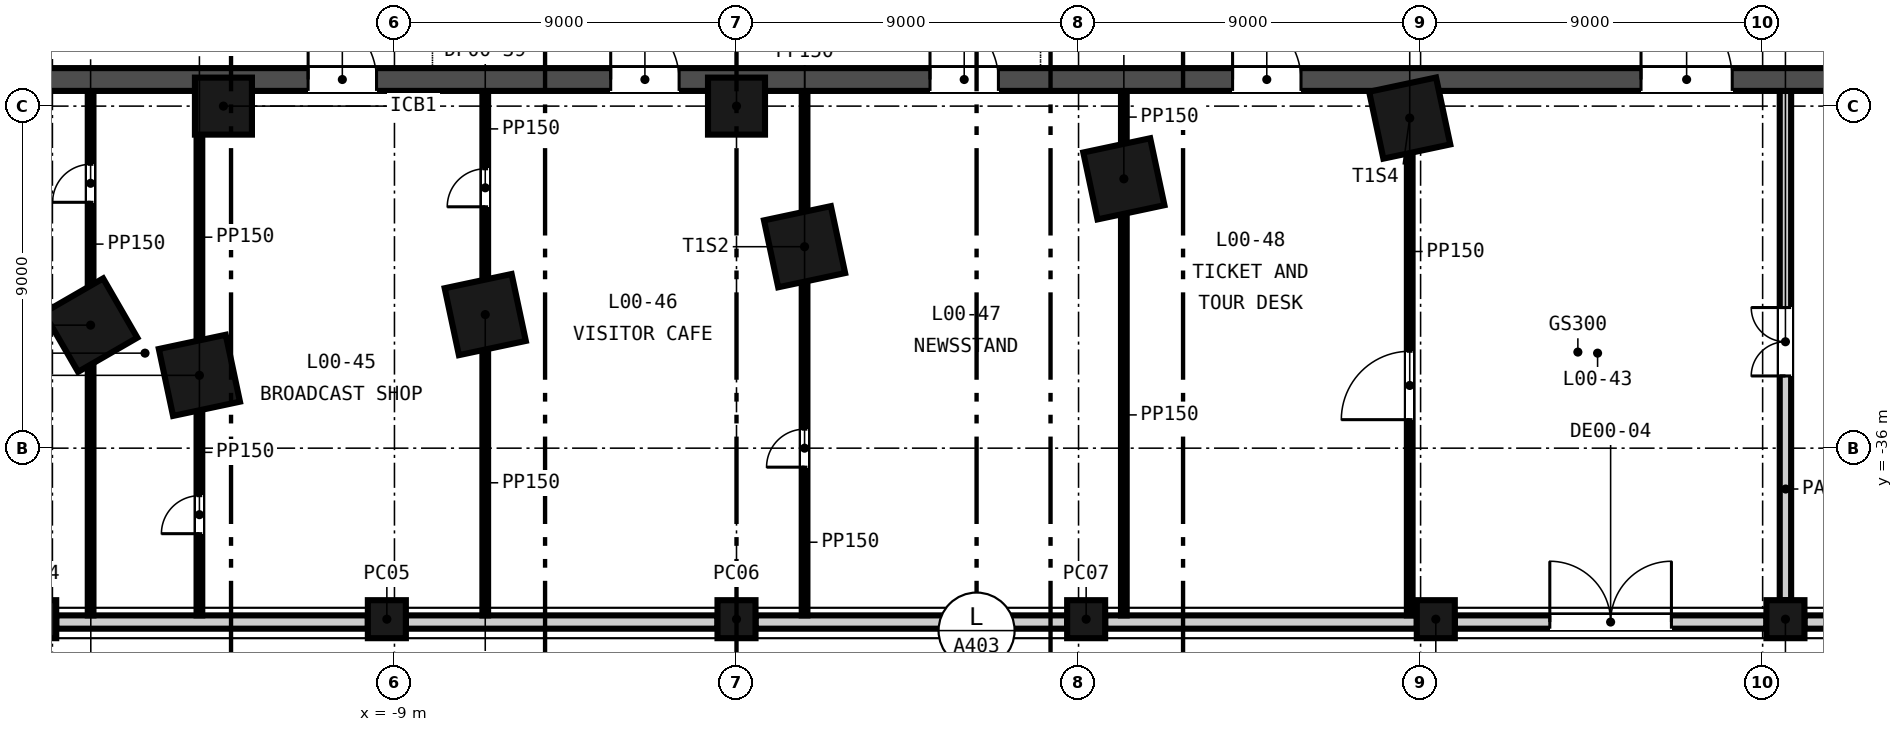
"""IFC4 building model, lengths in metres.
Left out: names, types, materials, properties, quantities, classifications, styles, units other than length and angle.
Written with IfcOpenShell. Run it as: python <this file> out.ifc"""

import sys

from ifc_helpers import new_model, si_unit, direction, frame, frame_2d, origin, origin_2d, place, context, subcontext, project, spatial, rectangle, extrude, element, fill, save


model = new_model("IFC4")
c1 = context("Model", 3, precision=1e-05, world=origin(), true_north=direction((0.0, 1.0)))
c2 = subcontext(c1, "Body", "Model", "MODEL_VIEW")
j1 = project(units=[si_unit("LENGTHUNIT", "METRE"), si_unit("PLANEANGLEUNIT", "RADIAN")], contexts=[c1])
p1 = place(None, origin())
s1 = spatial("IfcSite", under=j1, at=p1, CompositionType="ELEMENT")
p2 = place(p1, origin())
s2 = spatial("IfcBuilding", under=s1, at=p2, CompositionType="ELEMENT")
p3 = place(p2, origin())
s3 = spatial("IfcBuildingStorey", under=s2, at=p3, CompositionType="ELEMENT", Elevation=0.0)
for number, where, z_axis, x_axis in (
    (1, (-16.995, -32.763, -0.3), (0.0, 0.0, 1.0), (0.5, -0.866, 0.0)),
    (2, (-14.132, -34.084, -0.3), (0.0, 0.0, 1.0), (0.978, 0.208, 0.0)),
    (3, (-6.611, -32.485, -0.3), (0.0, 0.0, 1.0), (0.978, 0.208, 0.0)),
    (4, (1.791, -30.699, -0.3), (0.0, 0.0, 1.0), (0.978, 0.208, 0.0)),
    (5, (10.192, -28.914, -0.3), (0.0, 0.0, 1.0), (0.978, 0.208, 0.0)),
    (6, (17.714, -27.315, -0.3), (0.0, 0.0, 1.0), (0.978, 0.208, 0.0)),
):
    element("IfcColumn", number, at=place(p3, frame(where, z_axis=z_axis, x_axis=x_axis)), inside=s3, PredefinedType="COLUMN", context=c2, shape_type="SweptSolid", body=[
        extrude(rectangle(XDim=1.8, YDim=1.8, at=origin_2d()), origin(), (0.0, 0.0, 1.0), 8.9),
    ])
for number, where, z_axis, x_axis in (
    (7, (-13.5, -27.0, -0.3), (0.0, 0.0, 1.0), (1.0, 0.0, 0.0)),
    (8, (0.0, -27.0, -0.3), (0.0, 0.0, 1.0), (1.0, 0.0, 0.0)),
):
    element("IfcColumn", number, at=place(p3, frame(where, z_axis=z_axis, x_axis=x_axis)), inside=s3, PredefinedType="COLUMN", context=c2, shape_type="SweptSolid", body=[
        extrude(rectangle(XDim=1.5, YDim=1.5, at=origin_2d()), origin(), (0.0, 0.0, 1.0), 8.9),
    ])
for number, where, z_axis, x_axis in (
    (9, (-18.4, -40.5, -0.3), (0.0, 0.0, 1.0), (1.0, 0.0, 0.0)),
    (10, (-9.2, -40.5, -0.3), (0.0, 0.0, 1.0), (1.0, 0.0, 0.0)),
    (11, (0.0, -40.5, -0.3), (0.0, 0.0, 1.0), (1.0, 0.0, 0.0)),
    (12, (9.2, -40.5, -0.3), (0.0, 0.0, 1.0), (1.0, 0.0, 0.0)),
    (13, (18.4, -40.5, -0.3), (0.0, 0.0, 1.0), (1.0, 0.0, 0.0)),
    (14, (27.6, -40.5, -0.3), (0.0, 0.0, 1.0), (1.0, 0.0, 0.0)),
):
    element("IfcColumn", number, at=place(p3, frame(where, z_axis=z_axis, x_axis=x_axis)), inside=s3, PredefinedType="COLUMN", context=c2, shape_type="SweptSolid", body=[
        extrude(rectangle(XDim=1.0, YDim=1.0, at=origin_2d()), origin(), (0.0, 0.0, 1.0), 8.9),
    ])
p4 = place(p3, frame((-19.861, -26.3, -0.3), z_axis=(0.0, 0.0, 1.0), x_axis=(1.0, 0.0, 0.0)))
e15 = element("IfcWall", 15, at=p4, inside=s3, PredefinedType="SOLIDWALL", context=c2, shape_type="SweptSolid", body=[
    extrude(rectangle(XDim=71.861, YDim=0.6, at=frame_2d((35.93, 0.0))), origin(), (0.0, 0.0, 1.0), 8.9),
])
p5 = place(p4, frame((54.661, 0.0, 0.3)))
e16 = element("IfcOpeningElement", 16, at=p5, cuts=e15, PredefinedType="OPENING", context=c2, shape_type="SweptSolid", body=[
    extrude(rectangle(XDim=2.4, YDim=2.4, at=frame_2d((1.2, 1.2))), frame((0.0, 0.31, 0.0), z_axis=(0.0, -1.0, 0.0), x_axis=(1.0, 0.0, 0.0)), (0.0, 0.0, 1.0), 0.62),
])
p6 = place(p4, frame((8.589, 0.0, 0.3)))
e17 = element("IfcOpeningElement", 17, at=p6, cuts=e15, PredefinedType="OPENING", context=c2, shape_type="SweptSolid", body=[
    extrude(rectangle(XDim=1.8, YDim=2.4, at=frame_2d((0.9, 1.2))), frame((0.0, 0.31, 0.0), z_axis=(0.0, -1.0, 0.0), x_axis=(1.0, 0.0, 0.0)), (0.0, 0.0, 1.0), 0.62),
])
p7 = place(p4, frame((16.551, 0.0, 0.3)))
e18 = element("IfcOpeningElement", 18, at=p7, cuts=e15, PredefinedType="OPENING", context=c2, shape_type="SweptSolid", body=[
    extrude(rectangle(XDim=1.8, YDim=2.4, at=frame_2d((0.9, 1.2))), frame((0.0, 0.31, 0.0), z_axis=(0.0, -1.0, 0.0), x_axis=(1.0, 0.0, 0.0)), (0.0, 0.0, 1.0), 0.62),
])
p8 = place(p4, frame((24.952, 0.0, 0.3)))
e19 = element("IfcOpeningElement", 19, at=p8, cuts=e15, PredefinedType="OPENING", context=c2, shape_type="SweptSolid", body=[
    extrude(rectangle(XDim=1.8, YDim=2.4, at=frame_2d((0.9, 1.2))), frame((0.0, 0.31, 0.0), z_axis=(0.0, -1.0, 0.0), x_axis=(1.0, 0.0, 0.0)), (0.0, 0.0, 1.0), 0.62),
])
p9 = place(p4, frame((32.914, 0.0, 0.3)))
e20 = element("IfcOpeningElement", 20, at=p9, cuts=e15, PredefinedType="OPENING", context=c2, shape_type="SweptSolid", body=[
    extrude(rectangle(XDim=1.8, YDim=2.4, at=frame_2d((0.9, 1.2))), frame((0.0, 0.31, 0.0), z_axis=(0.0, -1.0, 0.0), x_axis=(1.0, 0.0, 0.0)), (0.0, 0.0, 1.0), 0.62),
])
p10 = place(p4, frame((43.661, 0.0, 0.3)))
e21 = element("IfcOpeningElement", 21, at=p10, cuts=e15, PredefinedType="OPENING", context=c2, shape_type="SweptSolid", body=[
    extrude(rectangle(XDim=2.4, YDim=2.4, at=frame_2d((1.2, 1.2))), frame((0.0, 0.31, 0.0), z_axis=(0.0, -1.0, 0.0), x_axis=(1.0, 0.0, 0.0)), (0.0, 0.0, 1.0), 0.62),
])
for number, where, z_axis, x_axis in (
    (22, (-17.9, -40.575, -0.3), (0.0, 0.0, 1.0), (1.0, 0.0, 0.0)),
    (23, (-8.7, -40.575, -0.3), (0.0, 0.0, 1.0), (1.0, 0.0, 0.0)),
    (24, (0.5, -40.575, -0.3), (0.0, 0.0, 1.0), (1.0, 0.0, 0.0)),
    (25, (9.7, -40.575, -0.3), (0.0, 0.0, 1.0), (1.0, 0.0, 0.0)),
):
    element("IfcWall", number, at=place(p3, frame(where, z_axis=z_axis, x_axis=x_axis)), inside=s3, PredefinedType="SOLIDWALL", context=c2, shape_type="SweptSolid", body=[
        extrude(rectangle(XDim=8.2, YDim=0.35, at=frame_2d((4.1, 0.0))), origin(), (0.0, 0.0, 1.0), 8.0),
    ])
p11 = place(p3, frame((18.9, -40.575, -0.3), z_axis=(0.0, 0.0, 1.0), x_axis=(1.0, 0.0, 0.0)))
e26 = element("IfcWall", 26, at=p11, inside=s3, PredefinedType="SOLIDWALL", context=c2, shape_type="SweptSolid", body=[
    extrude(rectangle(XDim=8.2, YDim=0.35, at=frame_2d((4.1, 0.0))), origin(), (0.0, 0.0, 1.0), 8.0),
])
p12 = place(p11, frame((2.5, 0.0, 0.3)))
e27 = element("IfcOpeningElement", 27, at=p12, cuts=e26, PredefinedType="OPENING", context=c2, shape_type="SweptSolid", body=[
    extrude(rectangle(XDim=3.2, YDim=4.0, at=frame_2d((1.6, 2.0))), frame((0.0, 0.185, 0.0), z_axis=(0.0, -1.0, 0.0), x_axis=(1.0, 0.0, 0.0)), (0.0, 0.0, 1.0), 0.37),
])
p13 = place(p3, frame((28.1, -40.575, -0.3), z_axis=(0.0, 0.0, 1.0), x_axis=(1.0, 0.0, 0.0)))
e28 = element("IfcWall", 28, at=p13, inside=s3, PredefinedType="SOLIDWALL", context=c2, shape_type="SweptSolid", body=[
    extrude(rectangle(XDim=8.2, YDim=0.35, at=frame_2d((4.1, 0.0))), origin(), (0.0, 0.0, 1.0), 8.0),
])
p14 = place(p3, frame((-16.995, -40.4, 0.0), z_axis=(0.0, 0.0, 1.0), x_axis=(0.0, 1.0, 0.0)))
e29 = element("IfcWall", 29, at=p14, inside=s3, PredefinedType="PARTITIONING", context=c2, shape_type="SweptSolid", body=[
    extrude(rectangle(XDim=6.554, YDim=0.15, at=frame_2d((3.277, 0.0))), origin(), (0.0, 0.0, 1.0), 8.6),
])
p15 = place(p3, frame((-16.995, -31.681, 0.0), z_axis=(0.0, 0.0, 1.0), x_axis=(0.0, 1.0, 0.0)))
e30 = element("IfcWall", 30, at=p15, inside=s3, PredefinedType="PARTITIONING", context=c2, shape_type="SweptSolid", body=[
    extrude(rectangle(XDim=5.081, YDim=0.15, at=frame_2d((2.54, 0.0))), origin(), (0.0, 0.0, 1.0), 8.6),
])
p16 = place(p15, frame((2.15, 0.0, 0.0)))
e31 = element("IfcOpeningElement", 31, at=p16, cuts=e30, PredefinedType="OPENING", context=c2, shape_type="SweptSolid", body=[
    extrude(rectangle(XDim=1.0, YDim=2.1, at=frame_2d((0.5, 1.05))), frame((0.0, 0.085, 0.0), z_axis=(0.0, -1.0, 0.0), x_axis=(1.0, 0.0, 0.0)), (0.0, 0.0, 1.0), 0.17),
])
p17 = place(p3, frame((-14.132, -40.4, 0.0), z_axis=(0.0, 0.0, 1.0), x_axis=(0.0, 1.0, 0.0)))
e32 = element("IfcWall", 32, at=p17, inside=s3, PredefinedType="PARTITIONING", context=c2, shape_type="SweptSolid", body=[
    extrude(rectangle(XDim=5.38, YDim=0.15, at=frame_2d((2.69, 0.0))), origin(), (0.0, 0.0, 1.0), 8.6),
])
p18 = place(p17, frame((2.15, 0.0, 0.0)))
e33 = element("IfcOpeningElement", 33, at=p18, cuts=e32, PredefinedType="OPENING", context=c2, shape_type="SweptSolid", body=[
    extrude(rectangle(XDim=1.0, YDim=2.1, at=frame_2d((0.5, 1.05))), frame((0.0, 0.085, 0.0), z_axis=(0.0, -1.0, 0.0), x_axis=(1.0, 0.0, 0.0)), (0.0, 0.0, 1.0), 0.17),
])
p19 = place(p3, frame((-14.132, -33.148, 0.0), z_axis=(0.0, 0.0, 1.0), x_axis=(0.0, 1.0, 0.0)))
e34 = element("IfcWall", 34, at=p19, inside=s3, PredefinedType="PARTITIONING", context=c2, shape_type="SweptSolid", body=[
    extrude(rectangle(XDim=5.398, YDim=0.15, at=frame_2d((2.699, 0.0))), origin(), (0.0, 0.0, 1.0), 8.6),
])
p20 = place(p3, frame((-6.611, -40.4, 0.0), z_axis=(0.0, 0.0, 1.0), x_axis=(0.0, 1.0, 0.0)))
e35 = element("IfcWall", 35, at=p20, inside=s3, PredefinedType="PARTITIONING", context=c2, shape_type="SweptSolid", body=[
    extrude(rectangle(XDim=6.979, YDim=0.15, at=frame_2d((3.489, 0.0))), origin(), (0.0, 0.0, 1.0), 8.6),
])
p21 = place(p3, frame((-6.611, -31.549, 0.0), z_axis=(0.0, 0.0, 1.0), x_axis=(0.0, 1.0, 0.0)))
e36 = element("IfcWall", 36, at=p21, inside=s3, PredefinedType="PARTITIONING", context=c2, shape_type="SweptSolid", body=[
    extrude(rectangle(XDim=4.949, YDim=0.15, at=frame_2d((2.475, 0.0))), origin(), (0.0, 0.0, 1.0), 8.6),
])
p22 = place(p21, frame((1.9, 0.0, 0.0)))
e37 = element("IfcOpeningElement", 37, at=p22, cuts=e36, PredefinedType="OPENING", context=c2, shape_type="SweptSolid", body=[
    extrude(rectangle(XDim=1.0, YDim=2.1, at=frame_2d((0.5, 1.05))), frame((0.0, 0.085, 0.0), z_axis=(0.0, -1.0, 0.0), x_axis=(1.0, 0.0, 0.0)), (0.0, 0.0, 1.0), 0.17),
])
p23 = place(p3, frame((1.791, -40.4, 0.0), z_axis=(0.0, 0.0, 1.0), x_axis=(0.0, 1.0, 0.0)))
e38 = element("IfcWall", 38, at=p23, inside=s3, PredefinedType="PARTITIONING", context=c2, shape_type="SweptSolid", body=[
    extrude(rectangle(XDim=8.765, YDim=0.15, at=frame_2d((4.382, 0.0))), origin(), (0.0, 0.0, 1.0), 8.6),
])
p24 = place(p23, frame((3.9, 0.0, 0.0)))
e39 = element("IfcOpeningElement", 39, at=p24, cuts=e38, PredefinedType="OPENING", context=c2, shape_type="SweptSolid", body=[
    extrude(rectangle(XDim=1.0, YDim=2.1, at=frame_2d((0.5, 1.05))), frame((0.0, 0.085, 0.0), z_axis=(0.0, -1.0, 0.0), x_axis=(1.0, 0.0, 0.0)), (0.0, 0.0, 1.0), 0.17),
])
p25 = place(p3, frame((1.791, -29.763, 0.0), z_axis=(0.0, 0.0, 1.0), x_axis=(0.0, 1.0, 0.0)))
e40 = element("IfcWall", 40, at=p25, inside=s3, PredefinedType="PARTITIONING", context=c2, shape_type="SweptSolid", body=[
    extrude(rectangle(XDim=3.163, YDim=0.15, at=frame_2d((1.582, 0.0))), origin(), (0.0, 0.0, 1.0), 8.6),
])
p26 = place(p3, frame((10.192, -40.4, 0.0), z_axis=(0.0, 0.0, 1.0), x_axis=(0.0, 1.0, 0.0)))
e41 = element("IfcWall", 41, at=p26, inside=s3, PredefinedType="PARTITIONING", context=c2, shape_type="SweptSolid", body=[
    extrude(rectangle(XDim=10.55, YDim=0.15, at=frame_2d((5.275, 0.0))), origin(), (0.0, 0.0, 1.0), 8.6),
])
p27 = place(p3, frame((10.192, -27.978, 0.0), z_axis=(0.0, 0.0, 1.0), x_axis=(0.0, 1.0, 0.0)))
e42 = element("IfcWall", 42, at=p27, inside=s3, PredefinedType="PARTITIONING", context=c2, shape_type="SweptSolid", body=[
    extrude(rectangle(XDim=1.377, YDim=0.15, at=frame_2d((0.689, 0.0))), origin(), (0.0, 0.0, 1.0), 8.6),
])
p28 = place(p3, frame((17.714, -40.4, 0.0), z_axis=(0.0, 0.0, 1.0), x_axis=(0.0, 1.0, 0.0)))
e43 = element("IfcWall", 43, at=p28, inside=s3, PredefinedType="PARTITIONING", context=c2, shape_type="SweptSolid", body=[
    extrude(rectangle(XDim=12.149, YDim=0.15, at=frame_2d((6.075, 0.0))), origin(), (0.0, 0.0, 1.0), 8.6),
])
p29 = place(p28, frame((5.15, 0.0, 0.0)))
e44 = element("IfcOpeningElement", 44, at=p29, cuts=e43, PredefinedType="OPENING", context=c2, shape_type="SweptSolid", body=[
    extrude(rectangle(XDim=1.8, YDim=2.4, at=frame_2d((0.9, 1.2))), frame((0.0, 0.085, 0.0), z_axis=(0.0, -1.0, 0.0), x_axis=(1.0, 0.0, 0.0)), (0.0, 0.0, 1.0), 0.17),
])
p30 = place(p3, frame((27.6, -40.0, 0.0), z_axis=(0.0, 0.0, 1.0), x_axis=(0.0, 1.0, 0.0)))
e45 = element("IfcWall", 45, at=p30, inside=s3, PredefinedType="PARTITIONING", context=c2, shape_type="SweptSolid", body=[
    extrude(rectangle(XDim=13.4, YDim=0.3, at=frame_2d((6.7, 0.0))), origin(), (0.0, 0.0, 1.0), 8.6),
])
p31 = place(p30, frame((5.9, 0.0, 0.0)))
e46 = element("IfcOpeningElement", 46, at=p31, cuts=e45, PredefinedType="OPENING", context=c2, shape_type="SweptSolid", body=[
    extrude(rectangle(XDim=1.8, YDim=2.4, at=frame_2d((0.9, 1.2))), frame((0.0, 0.16, 0.0), z_axis=(0.0, -1.0, 0.0), x_axis=(1.0, 0.0, 0.0)), (0.0, 0.0, 1.0), 0.32),
])
p32 = place(p12, origin())
e47 = element("IfcDoor", 47, at=p32, inside=s3, OperationType="DOUBLE_DOOR_SINGLE_SWING", PredefinedType="DOOR", context=c2, shape_type="SweptSolid", body=[
    extrude(rectangle(XDim=3.2, YDim=4.0, at=frame_2d((1.6, 2.0))), frame((0.0, 0.025, 0.0), z_axis=(0.0, -1.0, 0.0), x_axis=(1.0, 0.0, 0.0)), (0.0, 0.0, 1.0), 0.05),
])
fill(e27, e47)
p33 = place(p31, origin())
e48 = element("IfcDoor", 48, at=p33, inside=s3, OperationType="SINGLE_SWING_LEFT", PredefinedType="DOOR", context=c2, shape_type="SweptSolid", body=[
    extrude(rectangle(XDim=1.8, YDim=2.4, at=frame_2d((0.9, 1.2))), frame((0.0, 0.025, 0.0), z_axis=(0.0, -1.0, 0.0), x_axis=(1.0, 0.0, 0.0)), (0.0, 0.0, 1.0), 0.05),
])
fill(e46, e48)
p34 = place(p16, origin())
e49 = element("IfcDoor", 49, at=p34, inside=s3, OperationType="SINGLE_SWING_LEFT", PredefinedType="DOOR", context=c2, shape_type="SweptSolid", body=[
    extrude(rectangle(XDim=1.0, YDim=2.1, at=frame_2d((0.5, 1.05))), frame((0.0, 0.025, 0.0), z_axis=(0.0, -1.0, 0.0), x_axis=(1.0, 0.0, 0.0)), (0.0, 0.0, 1.0), 0.05),
])
fill(e31, e49)
p35 = place(p29, origin())
e50 = element("IfcDoor", 50, at=p35, inside=s3, OperationType="SINGLE_SWING_LEFT", PredefinedType="DOOR", context=c2, shape_type="SweptSolid", body=[
    extrude(rectangle(XDim=1.8, YDim=2.4, at=frame_2d((0.9, 1.2))), frame((0.0, 0.025, 0.0), z_axis=(0.0, -1.0, 0.0), x_axis=(1.0, 0.0, 0.0)), (0.0, 0.0, 1.0), 0.05),
])
fill(e44, e50)
p36 = place(p18, origin())
e51 = element("IfcDoor", 51, at=p36, inside=s3, OperationType="SINGLE_SWING_LEFT", PredefinedType="DOOR", context=c2, shape_type="SweptSolid", body=[
    extrude(rectangle(XDim=1.0, YDim=2.1, at=frame_2d((0.5, 1.05))), frame((0.0, 0.025, 0.0), z_axis=(0.0, -1.0, 0.0), x_axis=(1.0, 0.0, 0.0)), (0.0, 0.0, 1.0), 0.05),
])
fill(e33, e51)
p37 = place(p22, origin())
e52 = element("IfcDoor", 52, at=p37, inside=s3, OperationType="SINGLE_SWING_LEFT", PredefinedType="DOOR", context=c2, shape_type="SweptSolid", body=[
    extrude(rectangle(XDim=1.0, YDim=2.1, at=frame_2d((0.5, 1.05))), frame((0.0, 0.025, 0.0), z_axis=(0.0, -1.0, 0.0), x_axis=(1.0, 0.0, 0.0)), (0.0, 0.0, 1.0), 0.05),
])
fill(e37, e52)
p38 = place(p24, origin())
e53 = element("IfcDoor", 53, at=p38, inside=s3, OperationType="SINGLE_SWING_LEFT", PredefinedType="DOOR", context=c2, shape_type="SweptSolid", body=[
    extrude(rectangle(XDim=1.0, YDim=2.1, at=frame_2d((0.5, 1.05))), frame((0.0, 0.025, 0.0), z_axis=(0.0, -1.0, 0.0), x_axis=(1.0, 0.0, 0.0)), (0.0, 0.0, 1.0), 0.05),
])
fill(e39, e53)
p39 = place(p6, origin())
e54 = element("IfcDoor", 54, at=p39, inside=s3, OperationType="SINGLE_SWING_LEFT", PredefinedType="DOOR", context=c2, shape_type="SweptSolid", body=[
    extrude(rectangle(XDim=1.8, YDim=2.4, at=frame_2d((0.9, 1.2))), frame((0.0, 0.025, 0.0), z_axis=(0.0, -1.0, 0.0), x_axis=(1.0, 0.0, 0.0)), (0.0, 0.0, 1.0), 0.05),
])
fill(e17, e54)
p40 = place(p7, origin())
e55 = element("IfcDoor", 55, at=p40, inside=s3, OperationType="SINGLE_SWING_LEFT", PredefinedType="DOOR", context=c2, shape_type="SweptSolid", body=[
    extrude(rectangle(XDim=1.8, YDim=2.4, at=frame_2d((0.9, 1.2))), frame((0.0, 0.025, 0.0), z_axis=(0.0, -1.0, 0.0), x_axis=(1.0, 0.0, 0.0)), (0.0, 0.0, 1.0), 0.05),
])
fill(e18, e55)
p41 = place(p8, origin())
e56 = element("IfcDoor", 56, at=p41, inside=s3, OperationType="SINGLE_SWING_LEFT", PredefinedType="DOOR", context=c2, shape_type="SweptSolid", body=[
    extrude(rectangle(XDim=1.8, YDim=2.4, at=frame_2d((0.9, 1.2))), frame((0.0, 0.025, 0.0), z_axis=(0.0, -1.0, 0.0), x_axis=(1.0, 0.0, 0.0)), (0.0, 0.0, 1.0), 0.05),
])
fill(e19, e56)
p42 = place(p9, origin())
e57 = element("IfcDoor", 57, at=p42, inside=s3, OperationType="SINGLE_SWING_LEFT", PredefinedType="DOOR", context=c2, shape_type="SweptSolid", body=[
    extrude(rectangle(XDim=1.8, YDim=2.4, at=frame_2d((0.9, 1.2))), frame((0.0, 0.025, 0.0), z_axis=(0.0, -1.0, 0.0), x_axis=(1.0, 0.0, 0.0)), (0.0, 0.0, 1.0), 0.05),
])
fill(e20, e57)
p43 = place(p10, origin())
e58 = element("IfcDoor", 58, at=p43, inside=s3, OperationType="SINGLE_SWING_LEFT", PredefinedType="DOOR", context=c2, shape_type="SweptSolid", body=[
    extrude(rectangle(XDim=2.4, YDim=2.4, at=frame_2d((1.2, 1.2))), frame((0.0, 0.025, 0.0), z_axis=(0.0, -1.0, 0.0), x_axis=(1.0, 0.0, 0.0)), (0.0, 0.0, 1.0), 0.05),
])
fill(e21, e58)
save(model, sys.argv[1])
